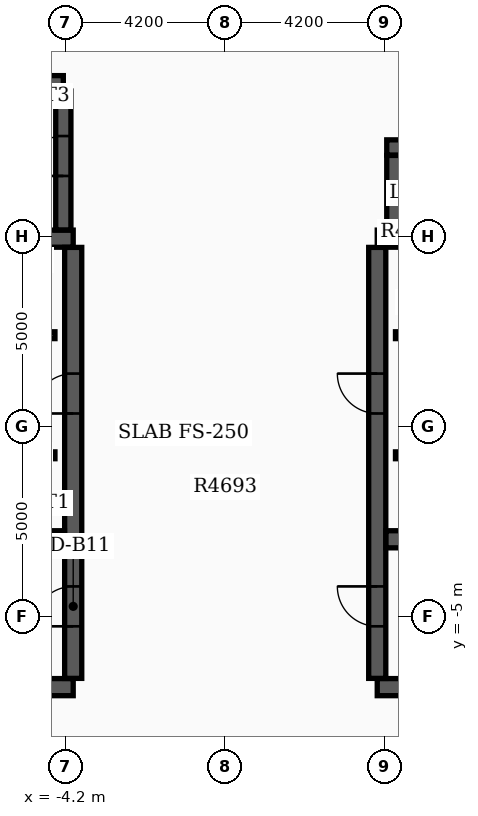
"""IFC4 building model, lengths in metres.
Left out: names, types, materials, properties, quantities, classifications, styles, units other than length and angle.
Written with IfcOpenShell. Run it as: python <this file> out.ifc"""

import sys

from ifc_helpers import new_model, si_unit, direction, frame, frame_2d, origin, place, context, subcontext, project, spatial, rectangle, extrude, element, fill, save


model = new_model("IFC4")
c1 = context("Model", 3, precision=1e-05, world=origin(), true_north=direction((0.0, 1.0)))
c2 = subcontext(c1, "Body", "Model", "MODEL_VIEW")
j1 = project(units=[si_unit("LENGTHUNIT", "METRE"), si_unit("PLANEANGLEUNIT", "RADIAN")], contexts=[c1])
p1 = place(None, origin())
s1 = spatial("IfcSite", under=j1, at=p1, CompositionType="ELEMENT")
p2 = place(p1, origin())
s2 = spatial("IfcBuilding", under=s1, at=p2, CompositionType="ELEMENT")
p3 = place(p2, frame((0.0, 0.0, 303.9)))
s3 = spatial("IfcBuildingStorey", under=s2, at=p3, CompositionType="ELEMENT", Elevation=303.9)
for number, where, z_axis, x_axis in (
    (1, (-12.4, -6.85, 0.0), (0.0, 0.0, 1.0), (1.0, 0.0, 0.0)),
    (2, (-12.4, 4.95, 0.0), (0.0, 0.0, 1.0), (1.0, 0.0, 0.0)),
):
    element("IfcWall", number, at=place(p3, frame(where, z_axis=z_axis, x_axis=x_axis)), inside=s3, PredefinedType="SHEAR", context=c2, shape_type="SweptSolid", body=[
        extrude(rectangle(XDim=8.4, YDim=0.45, at=frame_2d((4.2, 0.0))), origin(), (0.0, 0.0, 1.0), 4.25),
    ])
p4 = place(p3, frame((-4.0, -6.62, 0.0), z_axis=(0.0, 0.0, 1.0), x_axis=(0.0, 1.0, 0.0)))
e3 = element("IfcWall", 3, at=p4, inside=s3, PredefinedType="SHEAR", context=c2, shape_type="SweptSolid", body=[
    extrude(rectangle(XDim=11.34, YDim=0.45, at=frame_2d((5.67, 0.0))), origin(), (0.0, 0.0, 1.0), 4.25),
])
p5 = place(p4, frame((1.37, 0.0, 0.0)))
e4 = element("IfcOpeningElement", 4, at=p5, cuts=e3, PredefinedType="OPENING", context=c2, shape_type="SweptSolid", body=[
    extrude(rectangle(XDim=1.05, YDim=2.15, at=frame_2d((0.525, 1.075))), frame((0.0, 0.235, 0.0), z_axis=(0.0, -1.0, 0.0), x_axis=(1.0, 0.0, 0.0)), (0.0, 0.0, 1.0), 0.47),
])
p6 = place(p4, frame((6.97, 0.0, 0.0)))
e5 = element("IfcOpeningElement", 5, at=p6, cuts=e3, PredefinedType="OPENING", context=c2, shape_type="SweptSolid", body=[
    extrude(rectangle(XDim=1.05, YDim=2.15, at=frame_2d((0.525, 1.075))), frame((0.0, 0.235, 0.0), z_axis=(0.0, -1.0, 0.0), x_axis=(1.0, 0.0, 0.0)), (0.0, 0.0, 1.0), 0.47),
])
p7 = place(p3, frame((-12.17, -2.96, 0.0), z_axis=(0.0, 0.0, 1.0), x_axis=(1.0, 0.0, 0.0)))
e6 = element("IfcWall", 6, at=p7, inside=s3, PredefinedType="SHEAR", context=c2, shape_type="SweptSolid", body=[
    extrude(rectangle(XDim=7.94, YDim=0.45, at=frame_2d((3.97, 0.0))), origin(), (0.0, 0.0, 1.0), 4.25),
])
for number, where, z_axis, x_axis in (
    (7, (4.0, -6.85, 0.0), (0.0, 0.0, 1.0), (1.0, 0.0, 0.0)),
    (8, (4.0, 4.95, 0.0), (0.0, 0.0, 1.0), (1.0, 0.0, 0.0)),
):
    element("IfcWall", number, at=place(p3, frame(where, z_axis=z_axis, x_axis=x_axis)), inside=s3, PredefinedType="SHEAR", context=c2, shape_type="SweptSolid", body=[
        extrude(rectangle(XDim=8.4, YDim=0.45, at=frame_2d((4.2, 0.0))), origin(), (0.0, 0.0, 1.0), 4.25),
    ])
p8 = place(p3, frame((4.0, -6.62, 0.0), z_axis=(0.0, 0.0, 1.0), x_axis=(0.0, 1.0, 0.0)))
e9 = element("IfcWall", 9, at=p8, inside=s3, PredefinedType="SHEAR", context=c2, shape_type="SweptSolid", body=[
    extrude(rectangle(XDim=11.34, YDim=0.45, at=frame_2d((5.67, 0.0))), origin(), (0.0, 0.0, 1.0), 4.25),
])
p9 = place(p8, frame((1.37, 0.0, 0.0)))
e10 = element("IfcOpeningElement", 10, at=p9, cuts=e9, PredefinedType="OPENING", context=c2, shape_type="SweptSolid", body=[
    extrude(rectangle(XDim=1.05, YDim=2.15, at=frame_2d((0.525, 1.075))), frame((0.0, 0.235, 0.0), z_axis=(0.0, -1.0, 0.0), x_axis=(1.0, 0.0, 0.0)), (0.0, 0.0, 1.0), 0.47),
])
p10 = place(p8, frame((6.97, 0.0, 0.0)))
e11 = element("IfcOpeningElement", 11, at=p10, cuts=e9, PredefinedType="OPENING", context=c2, shape_type="SweptSolid", body=[
    extrude(rectangle(XDim=1.05, YDim=2.15, at=frame_2d((0.525, 1.075))), frame((0.0, 0.235, 0.0), z_axis=(0.0, -1.0, 0.0), x_axis=(1.0, 0.0, 0.0)), (0.0, 0.0, 1.0), 0.47),
])
p11 = place(p3, frame((4.23, -2.96, 0.0), z_axis=(0.0, 0.0, 1.0), x_axis=(1.0, 0.0, 0.0)))
e12 = element("IfcWall", 12, at=p11, inside=s3, PredefinedType="SHEAR", context=c2, shape_type="SweptSolid", body=[
    extrude(rectangle(XDim=7.94, YDim=0.45, at=frame_2d((3.97, 0.0))), origin(), (0.0, 0.0, 1.0), 4.25),
])
p12 = place(p3, frame((-12.22, 9.04, 0.0), z_axis=(0.0, 0.0, 1.0), x_axis=(1.0, 0.0, 0.0)))
e13 = element("IfcWall", 13, at=p12, inside=s3, PredefinedType="SHEAR", context=c2, shape_type="SweptSolid", body=[
    extrude(rectangle(XDim=7.96, YDim=0.4, at=frame_2d((3.98, 0.0))), origin(), (0.0, 0.0, 1.0), 4.25),
])
p13 = place(p3, frame((-4.26, 5.18, 0.0), z_axis=(0.0, 0.0, 1.0), x_axis=(0.0, 1.0, 0.0)))
e14 = element("IfcWall", 14, at=p13, inside=s3, PredefinedType="SHEAR", context=c2, shape_type="SweptSolid", body=[
    extrude(rectangle(XDim=3.655, YDim=0.4, at=frame_2d((1.828, 0.0))), origin(), (0.0, 0.0, 1.0), 4.25),
])
p14 = place(p13, frame((1.42, 0.0, 0.0)))
e15 = element("IfcOpeningElement", 15, at=p14, cuts=e14, PredefinedType="OPENING", context=c2, shape_type="SweptSolid", body=[
    extrude(rectangle(XDim=1.05, YDim=2.15, at=frame_2d((0.525, 1.075))), frame((0.0, 0.21, 0.0), z_axis=(0.0, -1.0, 0.0), x_axis=(1.0, 0.0, 0.0)), (0.0, 0.0, 1.0), 0.42),
])
p15 = place(p3, frame((4.45, 5.18, 0.0), z_axis=(0.0, 0.0, 1.0), x_axis=(0.0, 1.0, 0.0)))
e16 = element("IfcWall", 16, at=p15, inside=s3, PredefinedType="SHEAR", context=c2, shape_type="SweptSolid", body=[
    extrude(rectangle(XDim=1.96, YDim=0.4, at=frame_2d((0.98, 0.0))), origin(), (0.0, 0.0, 1.0), 4.25),
])
p16 = place(p3, frame((4.25, 7.35, 0.0), z_axis=(0.0, 0.0, 1.0), x_axis=(1.0, 0.0, 0.0)))
e17 = element("IfcWall", 17, at=p16, inside=s3, PredefinedType="SHEAR", context=c2, shape_type="SweptSolid", body=[
    extrude(rectangle(XDim=5.4, YDim=0.4, at=frame_2d((2.7, 0.0))), origin(), (0.0, 0.0, 1.0), 4.25),
])
p17 = place(p16, frame((0.85, 0.0, 0.0)))
e18 = element("IfcOpeningElement", 18, at=p17, cuts=e17, PredefinedType="OPENING", context=c2, shape_type="SweptSolid", body=[
    extrude(rectangle(XDim=1.2, YDim=2.2, at=frame_2d((0.6, 1.1))), frame((0.0, 0.21, 0.0), z_axis=(0.0, -1.0, 0.0), x_axis=(1.0, 0.0, 0.0)), (0.0, 0.0, 1.0), 0.42),
])
p18 = place(p16, frame((3.25, 0.0, 0.0)))
e19 = element("IfcOpeningElement", 19, at=p18, cuts=e17, PredefinedType="OPENING", context=c2, shape_type="SweptSolid", body=[
    extrude(rectangle(XDim=1.2, YDim=2.2, at=frame_2d((0.6, 1.1))), frame((0.0, 0.21, 0.0), z_axis=(0.0, -1.0, 0.0), x_axis=(1.0, 0.0, 0.0)), (0.0, 0.0, 1.0), 0.42),
])
p19 = place(p3, frame((-11.9, 2.41, 0.0), z_axis=(0.0, 0.0, 1.0), x_axis=(1.0, 0.0, 0.0)))
e20 = element("IfcWall", 20, at=p19, inside=s3, PredefinedType="SOLIDWALL", context=c2, shape_type="SweptSolid", body=[
    extrude(rectangle(XDim=7.42, YDim=0.18, at=frame_2d((3.71, 0.0))), origin(), (0.0, 0.0, 1.0), 3.72),
])
p20 = place(p19, frame((0.55, 0.0, 0.0)))
e21 = element("IfcOpeningElement", 21, at=p20, cuts=e20, PredefinedType="OPENING", context=c2, shape_type="SweptSolid", body=[
    extrude(rectangle(XDim=1.1, YDim=2.15, at=frame_2d((0.55, 1.075))), frame((0.0, 0.1, 0.0), z_axis=(0.0, -1.0, 0.0), x_axis=(1.0, 0.0, 0.0)), (0.0, 0.0, 1.0), 0.2),
])
p21 = place(p19, frame((4.9, 0.0, 0.0)))
e22 = element("IfcOpeningElement", 22, at=p21, cuts=e20, PredefinedType="OPENING", context=c2, shape_type="SweptSolid", body=[
    extrude(rectangle(XDim=0.88, YDim=2.1, at=frame_2d((0.44, 1.05))), frame((0.0, 0.1, 0.0), z_axis=(0.0, -1.0, 0.0), x_axis=(1.0, 0.0, 0.0)), (0.0, 0.0, 1.0), 0.2),
])
p22 = place(p3, frame((4.48, 2.41, 0.0), z_axis=(0.0, 0.0, 1.0), x_axis=(1.0, 0.0, 0.0)))
e23 = element("IfcWall", 23, at=p22, inside=s3, PredefinedType="SOLIDWALL", context=c2, shape_type="SweptSolid", body=[
    extrude(rectangle(XDim=7.42, YDim=0.18, at=frame_2d((3.71, 0.0))), origin(), (0.0, 0.0, 1.0), 3.72),
])
p23 = place(p22, frame((5.67, 0.0, 0.0)))
e24 = element("IfcOpeningElement", 24, at=p23, cuts=e23, PredefinedType="OPENING", context=c2, shape_type="SweptSolid", body=[
    extrude(rectangle(XDim=1.1, YDim=2.15, at=frame_2d((0.55, 1.075))), frame((0.0, 0.1, 0.0), z_axis=(0.0, -1.0, 0.0), x_axis=(1.0, 0.0, 0.0)), (0.0, 0.0, 1.0), 0.2),
])
p24 = place(p22, frame((1.6, 0.0, 0.0)))
e25 = element("IfcOpeningElement", 25, at=p24, cuts=e23, PredefinedType="OPENING", context=c2, shape_type="SweptSolid", body=[
    extrude(rectangle(XDim=0.88, YDim=2.1, at=frame_2d((0.44, 1.05))), frame((0.0, 0.1, 0.0), z_axis=(0.0, -1.0, 0.0), x_axis=(1.0, 0.0, 0.0)), (0.0, 0.0, 1.0), 0.2),
])
p25 = place(p3, frame((-11.9, -0.75, 0.0), z_axis=(0.0, 0.0, 1.0), x_axis=(1.0, 0.0, 0.0)))
e26 = element("IfcWall", 26, at=p25, inside=s3, PredefinedType="SOLIDWALL", context=c2, shape_type="SweptSolid", body=[
    extrude(rectangle(XDim=7.42, YDim=0.18, at=frame_2d((3.71, 0.0))), origin(), (0.0, 0.0, 1.0), 3.72),
])
p26 = place(p25, frame((1.6, 0.0, 0.0)))
e27 = element("IfcOpeningElement", 27, at=p26, cuts=e26, PredefinedType="OPENING", context=c2, shape_type="SweptSolid", body=[
    extrude(rectangle(XDim=0.88, YDim=2.1, at=frame_2d((0.44, 1.05))), frame((0.0, 0.1, 0.0), z_axis=(0.0, -1.0, 0.0), x_axis=(1.0, 0.0, 0.0)), (0.0, 0.0, 1.0), 0.2),
])
p27 = place(p3, frame((4.48, -0.75, 0.0), z_axis=(0.0, 0.0, 1.0), x_axis=(1.0, 0.0, 0.0)))
e28 = element("IfcWall", 28, at=p27, inside=s3, PredefinedType="SOLIDWALL", context=c2, shape_type="SweptSolid", body=[
    extrude(rectangle(XDim=7.42, YDim=0.18, at=frame_2d((3.71, 0.0))), origin(), (0.0, 0.0, 1.0), 3.72),
])
p28 = place(p27, frame((1.6, 0.0, 0.0)))
e29 = element("IfcOpeningElement", 29, at=p28, cuts=e28, PredefinedType="OPENING", context=c2, shape_type="SweptSolid", body=[
    extrude(rectangle(XDim=0.88, YDim=2.1, at=frame_2d((0.44, 1.05))), frame((0.0, 0.1, 0.0), z_axis=(0.0, -1.0, 0.0), x_axis=(1.0, 0.0, 0.0)), (0.0, 0.0, 1.0), 0.2),
])
p29 = place(p5, origin())
e30 = element("IfcDoor", 30, at=p29, inside=s3, OperationType="SINGLE_SWING_LEFT", PredefinedType="DOOR", context=c2, shape_type="SweptSolid", body=[
    extrude(rectangle(XDim=1.05, YDim=2.15, at=frame_2d((0.525, 1.075))), frame((0.0, 0.025, 0.0), z_axis=(0.0, -1.0, 0.0), x_axis=(1.0, 0.0, 0.0)), (0.0, 0.0, 1.0), 0.05),
])
fill(e4, e30)
p30 = place(p9, origin())
e31 = element("IfcDoor", 31, at=p30, inside=s3, OperationType="SINGLE_SWING_RIGHT", PredefinedType="DOOR", context=c2, shape_type="SweptSolid", body=[
    extrude(rectangle(XDim=1.05, YDim=2.15, at=frame_2d((0.525, 1.075))), frame((0.0, 0.025, 0.0), z_axis=(0.0, -1.0, 0.0), x_axis=(1.0, 0.0, 0.0)), (0.0, 0.0, 1.0), 0.05),
])
fill(e10, e31)
p31 = place(p6, origin())
e32 = element("IfcDoor", 32, at=p31, inside=s3, OperationType="SINGLE_SWING_LEFT", PredefinedType="DOOR", context=c2, shape_type="SweptSolid", body=[
    extrude(rectangle(XDim=1.05, YDim=2.15, at=frame_2d((0.525, 1.075))), frame((0.0, 0.025, 0.0), z_axis=(0.0, -1.0, 0.0), x_axis=(1.0, 0.0, 0.0)), (0.0, 0.0, 1.0), 0.05),
])
fill(e5, e32)
p32 = place(p10, origin())
e33 = element("IfcDoor", 33, at=p32, inside=s3, OperationType="SINGLE_SWING_RIGHT", PredefinedType="DOOR", context=c2, shape_type="SweptSolid", body=[
    extrude(rectangle(XDim=1.05, YDim=2.15, at=frame_2d((0.525, 1.075))), frame((0.0, 0.025, 0.0), z_axis=(0.0, -1.0, 0.0), x_axis=(1.0, 0.0, 0.0)), (0.0, 0.0, 1.0), 0.05),
])
fill(e11, e33)
p33 = place(p14, origin())
e34 = element("IfcDoor", 34, at=p33, inside=s3, OperationType="SINGLE_SWING_LEFT", PredefinedType="DOOR", context=c2, shape_type="SweptSolid", body=[
    extrude(rectangle(XDim=1.05, YDim=2.15, at=frame_2d((0.525, 1.075))), frame((0.0, 0.025, 0.0), z_axis=(0.0, -1.0, 0.0), x_axis=(1.0, 0.0, 0.0)), (0.0, 0.0, 1.0), 0.05),
])
fill(e15, e34)
save(model, sys.argv[1])
